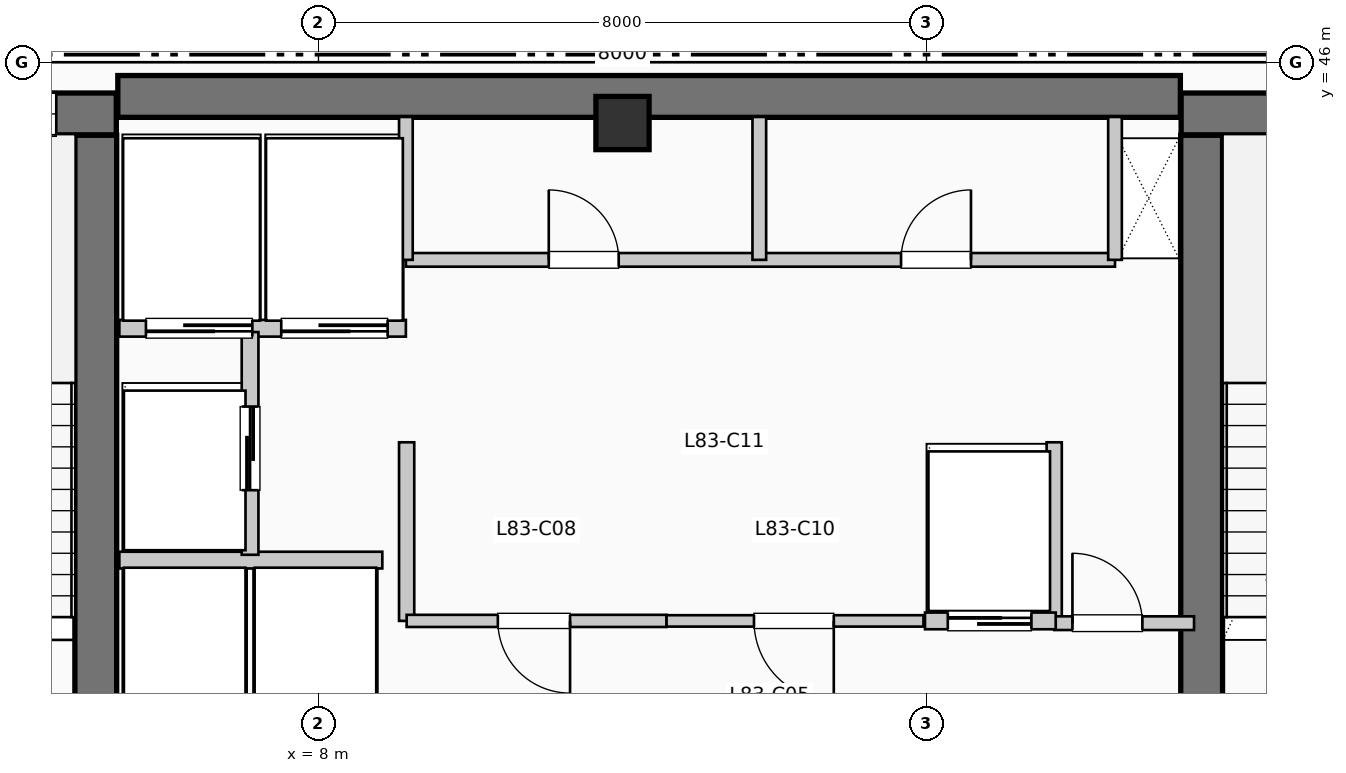
"""IFC4 building model, lengths in metres.
Left out: names, types, materials, properties, quantities, classifications, styles, units other than length and angle.
Written with IfcOpenShell. Run it as: python <this file> out.ifc"""

import sys

from ifc_helpers import new_model, si_unit, direction, frame, frame_2d, origin, origin_2d, place, context, subcontext, project, spatial, rectangle, extrude, element, fill, save


model = new_model("IFC4")
c1 = context("Model", 3, precision=1e-05, world=origin(), true_north=direction((0.0, 1.0)))
c2 = subcontext(c1, "Body", "Model", "MODEL_VIEW")
j1 = project(units=[si_unit("LENGTHUNIT", "METRE"), si_unit("PLANEANGLEUNIT", "RADIAN")], contexts=[c1])
p1 = place(None, origin())
s1 = spatial("IfcSite", under=j1, at=p1, CompositionType="ELEMENT")
p2 = place(p1, origin())
s2 = spatial("IfcBuilding", under=s1, at=p2, CompositionType="ELEMENT")
p3 = place(p2, frame((0.0, 0.0, 339.57)))
s3 = spatial("IfcBuildingStorey", under=s2, at=p3, CompositionType="ELEMENT", Elevation=339.57)
p4 = place(p3, frame((5.36, 45.55, 0.0), z_axis=(0.0, 0.0, 1.0), x_axis=(1.0, 0.0, 0.0)))
e1 = element("IfcWall", 1, at=p4, inside=s3, PredefinedType="SHEAR", context=c2, shape_type="SweptSolid", body=[
    extrude(rectangle(XDim=13.98, YDim=0.55, at=frame_2d((6.99, 0.0))), origin(), (0.0, 0.0, 1.0), 3.96),
])
p5 = place(p3, frame((5.07, 37.15, 0.0), z_axis=(0.0, 0.0, 1.0), x_axis=(0.0, 1.0, 0.0)))
e2 = element("IfcWall", 2, at=p5, inside=s3, PredefinedType="SHEAR", context=c2, shape_type="SweptSolid", body=[
    extrude(rectangle(XDim=7.89, YDim=0.55, at=frame_2d((3.945, 0.0))), origin(), (0.0, 0.0, 1.0), 3.96),
])
p6 = place(p3, frame((1.1, 45.32, 0.0), z_axis=(0.0, 0.0, 1.0), x_axis=(1.0, 0.0, 0.0)))
e3 = element("IfcWall", 3, at=p6, inside=s3, PredefinedType="SHEAR", context=c2, shape_type="SweptSolid", body=[
    extrude(rectangle(XDim=4.24, YDim=0.55, at=frame_2d((2.12, 0.0))), origin(), (0.0, 0.0, 1.0), 3.96),
])
p7 = place(p6, frame((2.05, 0.0, 1.05)))
e4 = element("IfcOpeningElement", 4, at=p7, cuts=e3, PredefinedType="OPENING", context=c2, shape_type="SweptSolid", body=[
    extrude(rectangle(XDim=1.4, YDim=1.8, at=frame_2d((0.7, 0.9))), frame((0.0, 0.285, 0.0), z_axis=(0.0, -1.0, 0.0), x_axis=(1.0, 0.0, 0.0)), (0.0, 0.0, 1.0), 0.57),
])
p8 = place(p3, frame((19.62, 37.15, 0.0), z_axis=(0.0, 0.0, 1.0), x_axis=(0.0, 1.0, 0.0)))
e5 = element("IfcWall", 5, at=p8, inside=s3, PredefinedType="SHEAR", context=c2, shape_type="SweptSolid", body=[
    extrude(rectangle(XDim=7.89, YDim=0.55, at=frame_2d((3.945, 0.0))), origin(), (0.0, 0.0, 1.0), 3.96),
])
p9 = place(p3, frame((19.35, 45.32, 0.0), z_axis=(0.0, 0.0, 1.0), x_axis=(1.0, 0.0, 0.0)))
e6 = element("IfcWall", 6, at=p9, inside=s3, PredefinedType="SHEAR", context=c2, shape_type="SweptSolid", body=[
    extrude(rectangle(XDim=3.69, YDim=0.55, at=frame_2d((1.845, 0.0))), origin(), (0.0, 0.0, 1.0), 3.96),
])
p10 = place(p9, frame((1.15, 0.0, 1.05)))
e7 = element("IfcOpeningElement", 7, at=p10, cuts=e6, PredefinedType="OPENING", context=c2, shape_type="SweptSolid", body=[
    extrude(rectangle(XDim=1.4, YDim=1.8, at=frame_2d((0.7, 0.9))), frame((0.0, 0.285, 0.0), z_axis=(0.0, -1.0, 0.0), x_axis=(1.0, 0.0, 0.0)), (0.0, 0.0, 1.0), 0.57),
])
p11 = place(p3, frame((12.0, 45.2, 0.0), z_axis=(0.0, 0.0, 1.0), x_axis=(1.0, 0.0, 0.0)))
e8 = element("IfcColumn", 8, at=p11, inside=s3, PredefinedType="COLUMN", context=c2, shape_type="SweptSolid", body=[
    extrude(rectangle(XDim=0.7, YDim=0.7, at=origin_2d()), origin(), (0.0, 0.0, 1.0), 3.96),
])
p12 = place(p3, frame((5.38, 39.45, 0.0), z_axis=(0.0, 0.0, 1.0), x_axis=(1.0, 0.0, 0.0)))
e9 = element("IfcWall", 9, at=p12, inside=s3, PredefinedType="PARTITIONING", context=c2, shape_type="SweptSolid", body=[
    extrude(rectangle(XDim=3.46, YDim=0.22, at=frame_2d((1.73, 0.0))), origin(), (0.0, 0.0, 1.0), 3.74),
])
p13 = place(p3, frame((5.38, 42.5, 0.0), z_axis=(0.0, 0.0, 1.0), x_axis=(1.0, 0.0, 0.0)))
e10 = element("IfcWall", 10, at=p13, inside=s3, PredefinedType="PARTITIONING", context=c2, shape_type="SweptSolid", body=[
    extrude(rectangle(XDim=3.77, YDim=0.22, at=frame_2d((1.885, 0.0))), origin(), (0.0, 0.0, 1.0), 3.74),
])
p14 = place(p13, frame((1.75, 0.0, 0.0), z_axis=(0.0, 0.0, 1.0), x_axis=(-1.0, 0.0, 0.0)))
e11 = element("IfcOpeningElement", 11, at=p14, cuts=e10, PredefinedType="OPENING", context=c2, shape_type="SweptSolid", body=[
    extrude(rectangle(XDim=1.4, YDim=2.2, at=frame_2d((0.7, 1.1))), frame((0.0, 0.12, 0.0), z_axis=(0.0, -1.0, 0.0), x_axis=(1.0, 0.0, 0.0)), (0.0, 0.0, 1.0), 0.24),
])
p15 = place(p13, frame((3.53, 0.0, 0.0), z_axis=(0.0, 0.0, 1.0), x_axis=(-1.0, 0.0, 0.0)))
e12 = element("IfcOpeningElement", 12, at=p15, cuts=e10, PredefinedType="OPENING", context=c2, shape_type="SweptSolid", body=[
    extrude(rectangle(XDim=1.4, YDim=2.2, at=frame_2d((0.7, 1.1))), frame((0.0, 0.12, 0.0), z_axis=(0.0, -1.0, 0.0), x_axis=(1.0, 0.0, 0.0)), (0.0, 0.0, 1.0), 0.24),
])
p16 = place(p3, frame((7.1, 39.52, 0.0), z_axis=(0.0, 0.0, 1.0), x_axis=(0.0, 1.0, 0.0)))
e13 = element("IfcWall", 13, at=p16, inside=s3, PredefinedType="PARTITIONING", context=c2, shape_type="SweptSolid", body=[
    extrude(rectangle(XDim=2.93, YDim=0.22, at=frame_2d((1.465, 0.0))), origin(), (0.0, 0.0, 1.0), 3.74),
])
p17 = place(p16, frame((0.85, 0.0, 0.0)))
e14 = element("IfcOpeningElement", 14, at=p17, cuts=e13, PredefinedType="OPENING", context=c2, shape_type="SweptSolid", body=[
    extrude(rectangle(XDim=1.1, YDim=2.2, at=frame_2d((0.55, 1.1))), frame((0.0, 0.12, 0.0), z_axis=(0.0, -1.0, 0.0), x_axis=(1.0, 0.0, 0.0)), (0.0, 0.0, 1.0), 0.24),
])
for number, where, z_axis, x_axis in (
    (15, (9.16, 38.65, 0.0), (0.0, 0.0, 1.0), (0.0, 1.0, 0.0)),
    (16, (17.68, 38.65, 0.0), (0.0, 0.0, 1.0), (0.0, 1.0, 0.0)),
):
    element("IfcWall", number, at=place(p3, frame(where, z_axis=z_axis, x_axis=x_axis)), inside=s3, PredefinedType="PARTITIONING", context=c2, shape_type="SweptSolid", body=[
        extrude(rectangle(XDim=2.35, YDim=0.2, at=frame_2d((1.175, 0.0))), origin(), (0.0, 0.0, 1.0), 3.74),
    ])
p18 = place(p3, frame((17.68, 38.62, 0.0), z_axis=(0.0, 0.0, 1.0), x_axis=(1.0, 0.0, 0.0)))
e17 = element("IfcWall", 17, at=p18, inside=s3, PredefinedType="PARTITIONING", context=c2, shape_type="SweptSolid", body=[
    extrude(rectangle(XDim=1.84, YDim=0.18, at=frame_2d((0.92, 0.0))), origin(), (0.0, 0.0, 1.0), 3.74),
])
p19 = place(p18, frame((0.24, 0.0, 0.0)))
e18 = element("IfcOpeningElement", 18, at=p19, cuts=e17, PredefinedType="OPENING", context=c2, shape_type="SweptSolid", body=[
    extrude(rectangle(XDim=0.92, YDim=2.1, at=frame_2d((0.46, 1.05))), frame((0.0, 0.1, 0.0), z_axis=(0.0, -1.0, 0.0), x_axis=(1.0, 0.0, 0.0)), (0.0, 0.0, 1.0), 0.2),
])
p20 = place(p3, frame((9.16, 38.65, 0.0), z_axis=(0.0, 0.0, 1.0), x_axis=(1.0, 0.0, 0.0)))
e19 = element("IfcWall", 19, at=p20, inside=s3, PredefinedType="PARTITIONING", context=c2, shape_type="SweptSolid", body=[
    extrude(rectangle(XDim=3.42, YDim=0.16, at=frame_2d((1.71, 0.0))), origin(), (0.0, 0.0, 1.0), 3.74),
])
p21 = place(p20, frame((2.15, 0.0, 0.0), z_axis=(0.0, 0.0, 1.0), x_axis=(-1.0, 0.0, 0.0)))
e20 = element("IfcOpeningElement", 20, at=p21, cuts=e19, PredefinedType="OPENING", context=c2, shape_type="SweptSolid", body=[
    extrude(rectangle(XDim=0.95, YDim=2.15, at=frame_2d((0.475, 1.075))), frame((0.0, 0.09, 0.0), z_axis=(0.0, -1.0, 0.0), x_axis=(1.0, 0.0, 0.0)), (0.0, 0.0, 1.0), 0.18),
])
p22 = place(p3, frame((12.58, 38.65, 0.0), z_axis=(0.0, 0.0, 1.0), x_axis=(1.0, 0.0, 0.0)))
e21 = element("IfcWall", 21, at=p22, inside=s3, PredefinedType="PARTITIONING", context=c2, shape_type="SweptSolid", body=[
    extrude(rectangle(XDim=3.38, YDim=0.15, at=frame_2d((1.69, 0.0))), origin(), (0.0, 0.0, 1.0), 3.74),
])
p23 = place(p22, frame((2.2, 0.0, 0.0), z_axis=(0.0, 0.0, 1.0), x_axis=(-1.0, 0.0, 0.0)))
e22 = element("IfcOpeningElement", 22, at=p23, cuts=e21, PredefinedType="OPENING", context=c2, shape_type="SweptSolid", body=[
    extrude(rectangle(XDim=1.05, YDim=2.15, at=frame_2d((0.525, 1.075))), frame((0.0, 0.085, 0.0), z_axis=(0.0, -1.0, 0.0), x_axis=(1.0, 0.0, 0.0)), (0.0, 0.0, 1.0), 0.17),
])
p24 = place(p3, frame((15.98, 38.65, 0.0), z_axis=(0.0, 0.0, 1.0), x_axis=(1.0, 0.0, 0.0)))
e23 = element("IfcWall", 23, at=p24, inside=s3, PredefinedType="PARTITIONING", context=c2, shape_type="SweptSolid", body=[
    extrude(rectangle(XDim=1.72, YDim=0.22, at=frame_2d((0.86, 0.0))), origin(), (0.0, 0.0, 1.0), 3.74),
])
p25 = place(p24, frame((0.3, 0.0, 0.0)))
e24 = element("IfcOpeningElement", 24, at=p25, cuts=e23, PredefinedType="OPENING", context=c2, shape_type="SweptSolid", body=[
    extrude(rectangle(XDim=1.1, YDim=2.2, at=frame_2d((0.55, 1.1))), frame((0.0, 0.12, 0.0), z_axis=(0.0, -1.0, 0.0), x_axis=(1.0, 0.0, 0.0)), (0.0, 0.0, 1.0), 0.24),
])
p26 = place(p3, frame((9.15, 43.4, 0.0), z_axis=(0.0, 0.0, 1.0), x_axis=(1.0, 0.0, 0.0)))
e25 = element("IfcWall", 25, at=p26, inside=s3, PredefinedType="PLUMBINGWALL", context=c2, shape_type="SweptSolid", body=[
    extrude(rectangle(XDim=9.33, YDim=0.18, at=frame_2d((4.665, 0.0))), origin(), (0.0, 0.0, 1.0), 3.74),
])
p27 = place(p26, frame((1.88, 0.0, 0.0)))
e26 = element("IfcOpeningElement", 26, at=p27, cuts=e25, PredefinedType="OPENING", context=c2, shape_type="SweptSolid", body=[
    extrude(rectangle(XDim=0.92, YDim=2.1, at=frame_2d((0.46, 1.05))), frame((0.0, 0.1, 0.0), z_axis=(0.0, -1.0, 0.0), x_axis=(1.0, 0.0, 0.0)), (0.0, 0.0, 1.0), 0.2),
])
p28 = place(p26, frame((6.515, 0.0, 0.0)))
e27 = element("IfcOpeningElement", 27, at=p28, cuts=e25, PredefinedType="OPENING", context=c2, shape_type="SweptSolid", body=[
    extrude(rectangle(XDim=0.92, YDim=2.1, at=frame_2d((0.46, 1.05))), frame((0.0, 0.1, 0.0), z_axis=(0.0, -1.0, 0.0), x_axis=(1.0, 0.0, 0.0)), (0.0, 0.0, 1.0), 0.2),
])
for number, where, z_axis, x_axis in (
    (28, (9.15, 43.4, 0.0), (0.0, 0.0, 1.0), (0.0, 1.0, 0.0)),
    (29, (18.48, 43.4, 0.0), (0.0, 0.0, 1.0), (0.0, 1.0, 0.0)),
    (30, (13.8, 43.4, 0.0), (0.0, 0.0, 1.0), (0.0, 1.0, 0.0)),
):
    element("IfcWall", number, at=place(p3, frame(where, z_axis=z_axis, x_axis=x_axis)), inside=s3, PredefinedType="PLUMBINGWALL", context=c2, shape_type="SweptSolid", body=[
        extrude(rectangle(XDim=1.88, YDim=0.18, at=frame_2d((0.94, 0.0))), origin(), (0.0, 0.0, 1.0), 3.74),
    ])
p29 = place(p7, origin())
e31 = element("IfcWindow", 31, at=p29, inside=s3, PartitioningType="SINGLE_PANEL", PredefinedType="WINDOW", context=c2, shape_type="SweptSolid", body=[
    extrude(rectangle(XDim=1.4, YDim=1.8, at=frame_2d((0.7, 0.9))), frame((0.0, 0.03, 0.0), z_axis=(0.0, -1.0, 0.0), x_axis=(1.0, 0.0, 0.0)), (0.0, 0.0, 1.0), 0.06),
])
fill(e4, e31)
p30 = place(p14, origin())
e32 = element("IfcDoor", 32, at=p30, inside=s3, OperationType="SLIDING_TO_LEFT", PredefinedType="DOOR", context=c2, shape_type="SweptSolid", body=[
    extrude(rectangle(XDim=1.4, YDim=2.2, at=frame_2d((0.7, 1.1))), frame((0.0, 0.025, 0.0), z_axis=(0.0, -1.0, 0.0), x_axis=(1.0, 0.0, 0.0)), (0.0, 0.0, 1.0), 0.05),
])
fill(e11, e32)
p31 = place(p15, origin())
e33 = element("IfcDoor", 33, at=p31, inside=s3, OperationType="SLIDING_TO_LEFT", PredefinedType="DOOR", context=c2, shape_type="SweptSolid", body=[
    extrude(rectangle(XDim=1.4, YDim=2.2, at=frame_2d((0.7, 1.1))), frame((0.0, 0.025, 0.0), z_axis=(0.0, -1.0, 0.0), x_axis=(1.0, 0.0, 0.0)), (0.0, 0.0, 1.0), 0.05),
])
fill(e12, e33)
p32 = place(p17, origin())
e34 = element("IfcDoor", 34, at=p32, inside=s3, OperationType="SLIDING_TO_LEFT", PredefinedType="DOOR", context=c2, shape_type="SweptSolid", body=[
    extrude(rectangle(XDim=1.1, YDim=2.2, at=frame_2d((0.55, 1.1))), frame((0.0, 0.025, 0.0), z_axis=(0.0, -1.0, 0.0), x_axis=(1.0, 0.0, 0.0)), (0.0, 0.0, 1.0), 0.05),
])
fill(e14, e34)
p33 = place(p19, origin())
e35 = element("IfcDoor", 35, at=p33, inside=s3, OperationType="SINGLE_SWING_LEFT", PredefinedType="DOOR", context=c2, shape_type="SweptSolid", body=[
    extrude(rectangle(XDim=0.92, YDim=2.1, at=frame_2d((0.46, 1.05))), frame((0.0, 0.025, 0.0), z_axis=(0.0, -1.0, 0.0), x_axis=(1.0, 0.0, 0.0)), (0.0, 0.0, 1.0), 0.05),
])
fill(e18, e35)
p34 = place(p21, origin())
e36 = element("IfcDoor", 36, at=p34, inside=s3, OperationType="SINGLE_SWING_RIGHT", PredefinedType="DOOR", context=c2, shape_type="SweptSolid", body=[
    extrude(rectangle(XDim=0.95, YDim=2.15, at=frame_2d((0.475, 1.075))), frame((0.0, 0.025, 0.0), z_axis=(0.0, -1.0, 0.0), x_axis=(1.0, 0.0, 0.0)), (0.0, 0.0, 1.0), 0.05),
])
fill(e20, e36)
p35 = place(p23, origin())
e37 = element("IfcDoor", 37, at=p35, inside=s3, OperationType="SINGLE_SWING_RIGHT", PredefinedType="DOOR", context=c2, shape_type="SweptSolid", body=[
    extrude(rectangle(XDim=1.05, YDim=2.15, at=frame_2d((0.525, 1.075))), frame((0.0, 0.025, 0.0), z_axis=(0.0, -1.0, 0.0), x_axis=(1.0, 0.0, 0.0)), (0.0, 0.0, 1.0), 0.05),
])
fill(e22, e37)
p36 = place(p25, origin())
e38 = element("IfcDoor", 38, at=p36, inside=s3, OperationType="SLIDING_TO_LEFT", PredefinedType="DOOR", context=c2, shape_type="SweptSolid", body=[
    extrude(rectangle(XDim=1.1, YDim=2.2, at=frame_2d((0.55, 1.1))), frame((0.0, 0.025, 0.0), z_axis=(0.0, -1.0, 0.0), x_axis=(1.0, 0.0, 0.0)), (0.0, 0.0, 1.0), 0.05),
])
fill(e24, e38)
p37 = place(p27, origin())
e39 = element("IfcDoor", 39, at=p37, inside=s3, OperationType="SINGLE_SWING_LEFT", PredefinedType="DOOR", context=c2, shape_type="SweptSolid", body=[
    extrude(rectangle(XDim=0.92, YDim=2.1, at=frame_2d((0.46, 1.05))), frame((0.0, 0.025, 0.0), z_axis=(0.0, -1.0, 0.0), x_axis=(1.0, 0.0, 0.0)), (0.0, 0.0, 1.0), 0.05),
])
fill(e26, e39)
p38 = place(p28, origin())
e40 = element("IfcDoor", 40, at=p38, inside=s3, OperationType="SINGLE_SWING_RIGHT", PredefinedType="DOOR", context=c2, shape_type="SweptSolid", body=[
    extrude(rectangle(XDim=0.92, YDim=2.1, at=frame_2d((0.46, 1.05))), frame((0.0, 0.025, 0.0), z_axis=(0.0, -1.0, 0.0), x_axis=(1.0, 0.0, 0.0)), (0.0, 0.0, 1.0), 0.05),
])
fill(e27, e40)
save(model, sys.argv[1])
